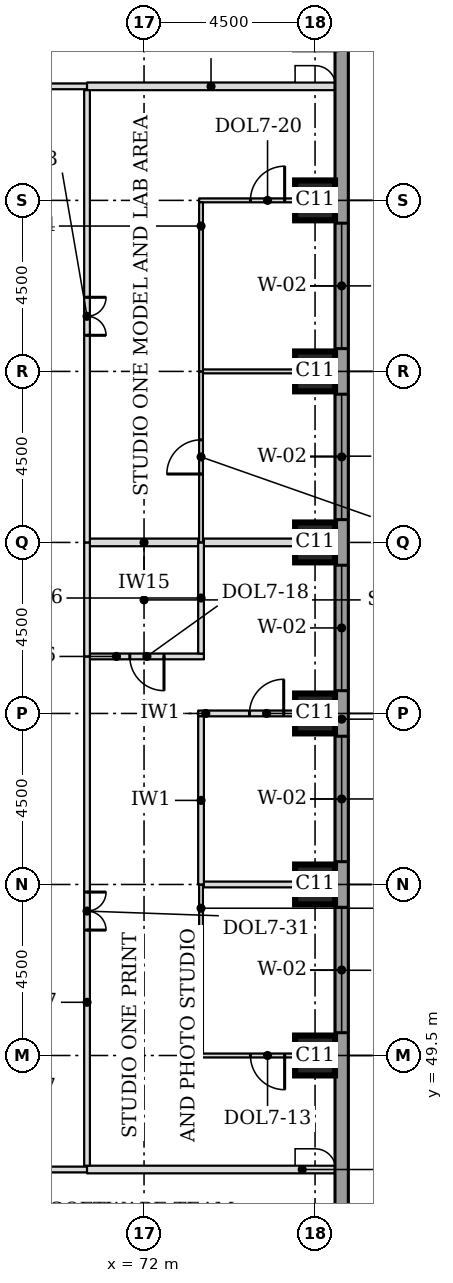
"""IFC4 building model, lengths in metres.
Left out: names, types, materials, properties, quantities, classifications, styles, units other than length and angle.
Written with IfcOpenShell. Run it as: python <this file> out.ifc"""

import sys

from ifc_helpers import new_model, si_unit, direction, frame, frame_2d, origin, origin_2d, place, context, subcontext, project, spatial, rectangle, extrude, element, fill, save


model = new_model("IFC4")
c1 = context("Model", 3, precision=1e-05, world=origin(), true_north=direction((0.0, 1.0)))
c2 = subcontext(c1, "Body", "Model", "MODEL_VIEW")
j1 = project(units=[si_unit("LENGTHUNIT", "METRE"), si_unit("PLANEANGLEUNIT", "RADIAN")], contexts=[c1])
p1 = place(None, origin())
s1 = spatial("IfcSite", under=j1, at=p1, CompositionType="ELEMENT")
p2 = place(p1, origin())
s2 = spatial("IfcBuilding", under=s1, at=p2, CompositionType="ELEMENT")
p3 = place(p2, frame((0.0, 0.0, 127.0)))
s3 = spatial("IfcBuildingStorey", under=s2, at=p3, CompositionType="ELEMENT", Elevation=127.0)
for number, where, z_axis, x_axis in (
    (1, (76.5, 49.5, 0.0), (0.0, 0.0, 1.0), (1.0, 0.0, 0.0)),
    (2, (76.5, 54.0, 0.0), (0.0, 0.0, 1.0), (1.0, 0.0, 0.0)),
    (3, (76.5, 58.5, 0.0), (0.0, 0.0, 1.0), (1.0, 0.0, 0.0)),
    (4, (76.5, 63.0, 0.0), (0.0, 0.0, 1.0), (1.0, 0.0, 0.0)),
    (5, (76.5, 67.5, 0.0), (0.0, 0.0, 1.0), (1.0, 0.0, 0.0)),
    (6, (76.5, 72.0, 0.0), (0.0, 0.0, 1.0), (1.0, 0.0, 0.0)),
):
    element("IfcColumn", number, at=place(p3, frame(where, z_axis=z_axis, x_axis=x_axis)), inside=s3, PredefinedType="COLUMN", context=c2, shape_type="SweptSolid", body=[
        extrude(rectangle(XDim=1.05, YDim=1.05, at=origin_2d()), origin(), (0.0, 0.0, 1.0), 3.7),
    ])
p4 = place(p3, frame((77.2, 44.638, 0.0), z_axis=(0.0, 0.0, 1.0), x_axis=(0.0, 1.0, 0.0)))
e7 = element("IfcWall", 7, at=p4, inside=s3, PredefinedType="STANDARD", context=c2, shape_type="SweptSolid", body=[
    extrude(rectangle(XDim=32.225, YDim=0.35, at=frame_2d((16.112, 0.0))), origin(), (0.0, 0.0, 1.0), 3.525),
])
p5 = place(p4, frame((5.462, 0.0, 0.9)))
e8 = element("IfcOpeningElement", 8, at=p5, cuts=e7, PredefinedType="OPENING", context=c2, shape_type="SweptSolid", body=[
    extrude(rectangle(XDim=3.3, YDim=1.9, at=frame_2d((1.65, 0.95))), frame((0.0, 0.185, 0.0), z_axis=(0.0, -1.0, 0.0), x_axis=(1.0, 0.0, 0.0)), (0.0, 0.0, 1.0), 0.37),
])
p6 = place(p4, frame((9.962, 0.0, 0.9)))
e9 = element("IfcOpeningElement", 9, at=p6, cuts=e7, PredefinedType="OPENING", context=c2, shape_type="SweptSolid", body=[
    extrude(rectangle(XDim=3.3, YDim=1.9, at=frame_2d((1.65, 0.95))), frame((0.0, 0.185, 0.0), z_axis=(0.0, -1.0, 0.0), x_axis=(1.0, 0.0, 0.0)), (0.0, 0.0, 1.0), 0.37),
])
p7 = place(p4, frame((14.462, 0.0, 0.9)))
e10 = element("IfcOpeningElement", 10, at=p7, cuts=e7, PredefinedType="OPENING", context=c2, shape_type="SweptSolid", body=[
    extrude(rectangle(XDim=3.3, YDim=1.9, at=frame_2d((1.65, 0.95))), frame((0.0, 0.185, 0.0), z_axis=(0.0, -1.0, 0.0), x_axis=(1.0, 0.0, 0.0)), (0.0, 0.0, 1.0), 0.37),
])
p8 = place(p4, frame((18.962, 0.0, 0.9)))
e11 = element("IfcOpeningElement", 11, at=p8, cuts=e7, PredefinedType="OPENING", context=c2, shape_type="SweptSolid", body=[
    extrude(rectangle(XDim=3.3, YDim=1.9, at=frame_2d((1.65, 0.95))), frame((0.0, 0.185, 0.0), z_axis=(0.0, -1.0, 0.0), x_axis=(1.0, 0.0, 0.0)), (0.0, 0.0, 1.0), 0.37),
])
p9 = place(p4, frame((23.462, 0.0, 0.9)))
e12 = element("IfcOpeningElement", 12, at=p9, cuts=e7, PredefinedType="OPENING", context=c2, shape_type="SweptSolid", body=[
    extrude(rectangle(XDim=3.3, YDim=1.9, at=frame_2d((1.65, 0.95))), frame((0.0, 0.185, 0.0), z_axis=(0.0, -1.0, 0.0), x_axis=(1.0, 0.0, 0.0)), (0.0, 0.0, 1.0), 0.37),
])
p10 = place(p3, frame((63.0, 46.5, 0.0), z_axis=(0.0, 0.0, 1.0), x_axis=(1.0, 0.0, 0.0)))
e13 = element("IfcWall", 13, at=p10, inside=s3, PredefinedType="PARTITIONING", context=c2, shape_type="SweptSolid", body=[
    extrude(rectangle(XDim=7.5, YDim=0.15, at=frame_2d((3.75, 0.0))), origin(), (0.0, 0.0, 1.0), 3.55),
])
p11 = place(p10, frame((3.25, 0.0, 0.0)))
e14 = element("IfcOpeningElement", 14, at=p11, cuts=e13, PredefinedType="OPENING", context=c2, shape_type="SweptSolid", body=[
    extrude(rectangle(XDim=1.0, YDim=2.1, at=frame_2d((0.5, 1.05))), frame((0.0, 0.085, 0.0), z_axis=(0.0, -1.0, 0.0), x_axis=(1.0, 0.0, 0.0)), (0.0, 0.0, 1.0), 0.17),
])
p12 = place(p3, frame((70.5, 46.5, 0.0), z_axis=(0.0, 0.0, 1.0), x_axis=(1.0, 0.0, 0.0)))
e15 = element("IfcWall", 15, at=p12, inside=s3, PredefinedType="PARTITIONING", context=c2, shape_type="SweptSolid", body=[
    extrude(rectangle(XDim=6.525, YDim=0.2, at=frame_2d((3.262, 0.0))), origin(), (0.0, 0.0, 1.0), 3.55),
])
p13 = place(p3, frame((73.45, 49.5, 0.0), z_axis=(0.0, 0.0, 1.0), x_axis=(1.0, 0.0, 0.0)))
e16 = element("IfcWall", 16, at=p13, inside=s3, PredefinedType="PARTITIONING", context=c2, shape_type="SweptSolid", body=[
    extrude(rectangle(XDim=3.575, YDim=0.1, at=frame_2d((1.788, 0.0))), origin(), (0.0, 0.0, 1.0), 3.55),
])
p14 = place(p13, frame((1.35, 0.0, 0.0)))
e17 = element("IfcOpeningElement", 17, at=p14, cuts=e16, PredefinedType="OPENING", context=c2, shape_type="SweptSolid", body=[
    extrude(rectangle(XDim=0.9, YDim=2.1, at=frame_2d((0.45, 1.05))), frame((0.0, 0.06, 0.0), z_axis=(0.0, -1.0, 0.0), x_axis=(1.0, 0.0, 0.0)), (0.0, 0.0, 1.0), 0.12),
])
p15 = place(p3, frame((73.575, 54.0, 0.0), z_axis=(0.0, 0.0, 1.0), x_axis=(1.0, 0.0, 0.0)))
e18 = element("IfcWall", 18, at=p15, inside=s3, PredefinedType="PARTITIONING", context=c2, shape_type="SweptSolid", body=[
    extrude(rectangle(XDim=3.45, YDim=0.15, at=frame_2d((1.725, 0.0))), origin(), (0.0, 0.0, 1.0), 3.55),
])
p16 = place(p3, frame((73.425, 58.5, 0.0), z_axis=(0.0, 0.0, 1.0), x_axis=(1.0, 0.0, 0.0)))
e19 = element("IfcWall", 19, at=p16, inside=s3, PredefinedType="PARTITIONING", context=c2, shape_type="SweptSolid", body=[
    extrude(rectangle(XDim=3.6, YDim=0.15, at=frame_2d((1.8, 0.0))), origin(), (0.0, 0.0, 1.0), 3.55),
])
p17 = place(p16, frame((1.35, 0.0, 0.0)))
e20 = element("IfcOpeningElement", 20, at=p17, cuts=e19, PredefinedType="OPENING", context=c2, shape_type="SweptSolid", body=[
    extrude(rectangle(XDim=0.9, YDim=2.1, at=frame_2d((0.45, 1.05))), frame((0.0, 0.085, 0.0), z_axis=(0.0, -1.0, 0.0), x_axis=(1.0, 0.0, 0.0)), (0.0, 0.0, 1.0), 0.17),
])
p18 = place(p3, frame((70.575, 60.0, 0.0), z_axis=(0.0, 0.0, 1.0), x_axis=(1.0, 0.0, 0.0)))
e21 = element("IfcWall", 21, at=p18, inside=s3, PredefinedType="PARTITIONING", context=c2, shape_type="SweptSolid", body=[
    extrude(rectangle(XDim=3.0, YDim=0.15, at=frame_2d((1.5, 0.0))), origin(), (0.0, 0.0, 1.0), 3.55),
])
p19 = place(p18, frame((1.05, 0.0, 0.0)))
e22 = element("IfcOpeningElement", 22, at=p19, cuts=e21, PredefinedType="OPENING", context=c2, shape_type="SweptSolid", body=[
    extrude(rectangle(XDim=0.9, YDim=2.1, at=frame_2d((0.45, 1.05))), frame((0.0, 0.085, 0.0), z_axis=(0.0, -1.0, 0.0), x_axis=(1.0, 0.0, 0.0)), (0.0, 0.0, 1.0), 0.17),
])
p20 = place(p3, frame((70.575, 63.0, 0.0), z_axis=(0.0, 0.0, 1.0), x_axis=(1.0, 0.0, 0.0)))
e23 = element("IfcWall", 23, at=p20, inside=s3, PredefinedType="PARTITIONING", context=c2, shape_type="SweptSolid", body=[
    extrude(rectangle(XDim=2.85, YDim=0.2, at=frame_2d((1.425, 0.0))), origin(), (0.0, 0.0, 1.0), 3.55),
])
p21 = place(p3, frame((73.575, 63.0, 0.0), z_axis=(0.0, 0.0, 1.0), x_axis=(1.0, 0.0, 0.0)))
e24 = element("IfcWall", 24, at=p21, inside=s3, PredefinedType="PARTITIONING", context=c2, shape_type="SweptSolid", body=[
    extrude(rectangle(XDim=3.45, YDim=0.2, at=frame_2d((1.725, 0.0))), origin(), (0.0, 0.0, 1.0), 3.55),
])
p22 = place(p3, frame((73.55, 67.5, 0.0), z_axis=(0.0, 0.0, 1.0), x_axis=(1.0, 0.0, 0.0)))
e25 = element("IfcWall", 25, at=p22, inside=s3, PredefinedType="PARTITIONING", context=c2, shape_type="SweptSolid", body=[
    extrude(rectangle(XDim=3.475, YDim=0.1, at=frame_2d((1.737, 0.0))), origin(), (0.0, 0.0, 1.0), 3.55),
])
p23 = place(p3, frame((73.45, 72.0, 0.0), z_axis=(0.0, 0.0, 1.0), x_axis=(1.0, 0.0, 0.0)))
e26 = element("IfcWall", 26, at=p23, inside=s3, PredefinedType="PARTITIONING", context=c2, shape_type="SweptSolid", body=[
    extrude(rectangle(XDim=3.575, YDim=0.1, at=frame_2d((1.788, 0.0))), origin(), (0.0, 0.0, 1.0), 3.55),
])
p24 = place(p23, frame((1.35, 0.0, 0.0)))
e27 = element("IfcOpeningElement", 27, at=p24, cuts=e26, PredefinedType="OPENING", context=c2, shape_type="SweptSolid", body=[
    extrude(rectangle(XDim=0.9, YDim=2.1, at=frame_2d((0.45, 1.05))), frame((0.0, 0.06, 0.0), z_axis=(0.0, -1.0, 0.0), x_axis=(1.0, 0.0, 0.0)), (0.0, 0.0, 1.0), 0.12),
])
p25 = place(p3, frame((58.5, 75.0, 0.0), z_axis=(0.0, 0.0, 1.0), x_axis=(1.0, 0.0, 0.0)))
e28 = element("IfcWall", 28, at=p25, inside=s3, PredefinedType="PARTITIONING", context=c2, shape_type="SweptSolid", body=[
    extrude(rectangle(XDim=12.0, YDim=0.15, at=frame_2d((6.0, 0.0))), origin(), (0.0, 0.0, 1.0), 3.55),
])
p26 = place(p25, frame((5.5, 0.0, 0.0)))
e29 = element("IfcOpeningElement", 29, at=p26, cuts=e28, PredefinedType="OPENING", context=c2, shape_type="SweptSolid", body=[
    extrude(rectangle(XDim=1.0, YDim=2.1, at=frame_2d((0.5, 1.05))), frame((0.0, 0.085, 0.0), z_axis=(0.0, -1.0, 0.0), x_axis=(1.0, 0.0, 0.0)), (0.0, 0.0, 1.0), 0.17),
])
p27 = place(p3, frame((70.5, 75.0, 0.0), z_axis=(0.0, 0.0, 1.0), x_axis=(1.0, 0.0, 0.0)))
e30 = element("IfcWall", 30, at=p27, inside=s3, PredefinedType="PARTITIONING", context=c2, shape_type="SweptSolid", body=[
    extrude(rectangle(XDim=6.525, YDim=0.2, at=frame_2d((3.262, 0.0))), origin(), (0.0, 0.0, 1.0), 3.55),
])
p28 = place(p3, frame((70.5, 46.6, 0.0), z_axis=(0.0, 0.0, 1.0), x_axis=(0.0, 1.0, 0.0)))
e31 = element("IfcWall", 31, at=p28, inside=s3, PredefinedType="PARTITIONING", context=c2, shape_type="SweptSolid", body=[
    extrude(rectangle(XDim=13.4, YDim=0.15, at=frame_2d((6.7, 0.0))), origin(), (0.0, 0.0, 1.0), 3.55),
])
p29 = place(p28, frame((6.2, 0.0, 0.0)))
e32 = element("IfcOpeningElement", 32, at=p29, cuts=e31, PredefinedType="OPENING", context=c2, shape_type="SweptSolid", body=[
    extrude(rectangle(XDim=1.0, YDim=2.1, at=frame_2d((0.5, 1.05))), frame((0.0, 0.085, 0.0), z_axis=(0.0, -1.0, 0.0), x_axis=(1.0, 0.0, 0.0)), (0.0, 0.0, 1.0), 0.17),
])
p30 = place(p3, frame((73.5, 49.55, 0.0), z_axis=(0.0, 0.0, 1.0), x_axis=(0.0, 1.0, 0.0)))
e33 = element("IfcWall", 33, at=p30, inside=s3, PredefinedType="PARTITIONING", context=c2, shape_type="SweptSolid", body=[
    extrude(rectangle(XDim=4.45, YDim=0.1, at=frame_2d((2.225, 0.0))), origin(), (0.0, 0.0, 1.0), 3.55),
])
p31 = place(p3, frame((73.5, 54.0, 0.0), z_axis=(0.0, 0.0, 1.0), x_axis=(0.0, 1.0, 0.0)))
e34 = element("IfcWall", 34, at=p31, inside=s3, PredefinedType="PARTITIONING", context=c2, shape_type="SweptSolid", body=[
    extrude(rectangle(XDim=4.425, YDim=0.15, at=frame_2d((2.212, 0.0))), origin(), (0.0, 0.0, 1.0), 3.55),
])
p32 = place(p3, frame((70.5, 60.0, 0.0), z_axis=(0.0, 0.0, 1.0), x_axis=(0.0, 1.0, 0.0)))
e35 = element("IfcWall", 35, at=p32, inside=s3, PredefinedType="PARTITIONING", context=c2, shape_type="SweptSolid", body=[
    extrude(rectangle(XDim=3.0, YDim=0.15, at=frame_2d((1.5, 0.0))), origin(), (0.0, 0.0, 1.0), 3.55),
])
p33 = place(p3, frame((73.5, 60.075, 0.0), z_axis=(0.0, 0.0, 1.0), x_axis=(0.0, 1.0, 0.0)))
e36 = element("IfcWall", 36, at=p33, inside=s3, PredefinedType="PARTITIONING", context=c2, shape_type="SweptSolid", body=[
    extrude(rectangle(XDim=2.925, YDim=0.15, at=frame_2d((1.462, 0.0))), origin(), (0.0, 0.0, 1.0), 3.55),
])
p34 = place(p3, frame((70.5, 63.0, 0.0), z_axis=(0.0, 0.0, 1.0), x_axis=(0.0, 1.0, 0.0)))
e37 = element("IfcWall", 37, at=p34, inside=s3, PredefinedType="PARTITIONING", context=c2, shape_type="SweptSolid", body=[
    extrude(rectangle(XDim=11.9, YDim=0.15, at=frame_2d((5.95, 0.0))), origin(), (0.0, 0.0, 1.0), 3.55),
])
p35 = place(p34, frame((5.45, 0.0, 0.0)))
e38 = element("IfcOpeningElement", 38, at=p35, cuts=e37, PredefinedType="OPENING", context=c2, shape_type="SweptSolid", body=[
    extrude(rectangle(XDim=1.0, YDim=2.1, at=frame_2d((0.5, 1.05))), frame((0.0, 0.085, 0.0), z_axis=(0.0, -1.0, 0.0), x_axis=(1.0, 0.0, 0.0)), (0.0, 0.0, 1.0), 0.17),
])
p36 = place(p3, frame((73.5, 63.0, 0.0), z_axis=(0.0, 0.0, 1.0), x_axis=(0.0, 1.0, 0.0)))
e39 = element("IfcWall", 39, at=p36, inside=s3, PredefinedType="PARTITIONING", context=c2, shape_type="SweptSolid", body=[
    extrude(rectangle(XDim=4.5, YDim=0.1, at=frame_2d((2.25, 0.0))), origin(), (0.0, 0.0, 1.0), 3.55),
])
p37 = place(p36, frame((1.8, 0.0, 0.0)))
e40 = element("IfcOpeningElement", 40, at=p37, cuts=e39, PredefinedType="OPENING", context=c2, shape_type="SweptSolid", body=[
    extrude(rectangle(XDim=0.9, YDim=2.1, at=frame_2d((0.45, 1.05))), frame((0.0, 0.06, 0.0), z_axis=(0.0, -1.0, 0.0), x_axis=(1.0, 0.0, 0.0)), (0.0, 0.0, 1.0), 0.12),
])
p38 = place(p3, frame((73.5, 67.5, 0.0), z_axis=(0.0, 0.0, 1.0), x_axis=(0.0, 1.0, 0.0)))
e41 = element("IfcWall", 41, at=p38, inside=s3, PredefinedType="PARTITIONING", context=c2, shape_type="SweptSolid", body=[
    extrude(rectangle(XDim=4.45, YDim=0.1, at=frame_2d((2.225, 0.0))), origin(), (0.0, 0.0, 1.0), 3.55),
])
p39 = place(p5, origin())
e42 = element("IfcWindow", 42, at=p39, inside=s3, PartitioningType="SINGLE_PANEL", PredefinedType="WINDOW", context=c2, shape_type="SweptSolid", body=[
    extrude(rectangle(XDim=3.3, YDim=1.9, at=frame_2d((1.65, 0.95))), frame((0.0, 0.085, 0.0), z_axis=(0.0, -1.0, 0.0), x_axis=(1.0, 0.0, 0.0)), (0.0, 0.0, 1.0), 0.06),
])
fill(e8, e42)
p40 = place(p6, origin())
e43 = element("IfcWindow", 43, at=p40, inside=s3, PartitioningType="SINGLE_PANEL", PredefinedType="WINDOW", context=c2, shape_type="SweptSolid", body=[
    extrude(rectangle(XDim=3.3, YDim=1.9, at=frame_2d((1.65, 0.95))), frame((0.0, 0.085, 0.0), z_axis=(0.0, -1.0, 0.0), x_axis=(1.0, 0.0, 0.0)), (0.0, 0.0, 1.0), 0.06),
])
fill(e9, e43)
p41 = place(p7, origin())
e44 = element("IfcWindow", 44, at=p41, inside=s3, PartitioningType="SINGLE_PANEL", PredefinedType="WINDOW", context=c2, shape_type="SweptSolid", body=[
    extrude(rectangle(XDim=3.3, YDim=1.9, at=frame_2d((1.65, 0.95))), frame((0.0, 0.085, 0.0), z_axis=(0.0, -1.0, 0.0), x_axis=(1.0, 0.0, 0.0)), (0.0, 0.0, 1.0), 0.06),
])
fill(e10, e44)
p42 = place(p8, origin())
e45 = element("IfcWindow", 45, at=p42, inside=s3, PartitioningType="SINGLE_PANEL", PredefinedType="WINDOW", context=c2, shape_type="SweptSolid", body=[
    extrude(rectangle(XDim=3.3, YDim=1.9, at=frame_2d((1.65, 0.95))), frame((0.0, 0.085, 0.0), z_axis=(0.0, -1.0, 0.0), x_axis=(1.0, 0.0, 0.0)), (0.0, 0.0, 1.0), 0.06),
])
fill(e11, e45)
p43 = place(p9, origin())
e46 = element("IfcWindow", 46, at=p43, inside=s3, PartitioningType="SINGLE_PANEL", PredefinedType="WINDOW", context=c2, shape_type="SweptSolid", body=[
    extrude(rectangle(XDim=3.3, YDim=1.9, at=frame_2d((1.65, 0.95))), frame((0.0, 0.085, 0.0), z_axis=(0.0, -1.0, 0.0), x_axis=(1.0, 0.0, 0.0)), (0.0, 0.0, 1.0), 0.06),
])
fill(e12, e46)
p44 = place(p29, frame((1.0, 0.0, 0.0), z_axis=(0.0, 0.0, 1.0), x_axis=(-1.0, 0.0, 0.0)))
e47 = element("IfcDoor", 47, at=p44, inside=s3, OperationType="DOUBLE_DOOR_SINGLE_SWING", PredefinedType="DOOR", context=c2, shape_type="SweptSolid", body=[
    extrude(rectangle(XDim=1.0, YDim=2.1, at=frame_2d((0.5, 1.05))), frame((0.0, 0.025, 0.0), z_axis=(0.0, -1.0, 0.0), x_axis=(1.0, 0.0, 0.0)), (0.0, 0.0, 1.0), 0.05),
])
fill(e32, e47)
p45 = place(p14, frame((0.9, 0.0, 0.0), z_axis=(0.0, 0.0, 1.0), x_axis=(-1.0, 0.0, 0.0)))
e48 = element("IfcDoor", 48, at=p45, inside=s3, OperationType="SINGLE_SWING_LEFT", PredefinedType="DOOR", context=c2, shape_type="SweptSolid", body=[
    extrude(rectangle(XDim=0.9, YDim=2.1, at=frame_2d((0.45, 1.05))), frame((0.0, 0.025, 0.0), z_axis=(0.0, -1.0, 0.0), x_axis=(1.0, 0.0, 0.0)), (0.0, 0.0, 1.0), 0.05),
])
fill(e17, e48)
p46 = place(p19, frame((0.9, 0.0, 0.0), z_axis=(0.0, 0.0, 1.0), x_axis=(-1.0, 0.0, 0.0)))
e49 = element("IfcDoor", 49, at=p46, inside=s3, OperationType="SINGLE_SWING_LEFT", PredefinedType="DOOR", context=c2, shape_type="SweptSolid", body=[
    extrude(rectangle(XDim=0.9, YDim=2.1, at=frame_2d((0.45, 1.05))), frame((0.0, 0.025, 0.0), z_axis=(0.0, -1.0, 0.0), x_axis=(1.0, 0.0, 0.0)), (0.0, 0.0, 1.0), 0.05),
])
fill(e22, e49)
p47 = place(p17, origin())
e50 = element("IfcDoor", 50, at=p47, inside=s3, OperationType="SINGLE_SWING_RIGHT", PredefinedType="DOOR", context=c2, shape_type="SweptSolid", body=[
    extrude(rectangle(XDim=0.9, YDim=2.1, at=frame_2d((0.45, 1.05))), frame((0.0, 0.025, 0.0), z_axis=(0.0, -1.0, 0.0), x_axis=(1.0, 0.0, 0.0)), (0.0, 0.0, 1.0), 0.05),
])
fill(e20, e50)
p48 = place(p35, frame((1.0, 0.0, 0.0), z_axis=(0.0, 0.0, 1.0), x_axis=(-1.0, 0.0, 0.0)))
e51 = element("IfcDoor", 51, at=p48, inside=s3, OperationType="DOUBLE_DOOR_SINGLE_SWING", PredefinedType="DOOR", context=c2, shape_type="SweptSolid", body=[
    extrude(rectangle(XDim=1.0, YDim=2.1, at=frame_2d((0.5, 1.05))), frame((0.0, 0.025, 0.0), z_axis=(0.0, -1.0, 0.0), x_axis=(1.0, 0.0, 0.0)), (0.0, 0.0, 1.0), 0.05),
])
fill(e38, e51)
p49 = place(p37, origin())
e52 = element("IfcDoor", 52, at=p49, inside=s3, OperationType="SINGLE_SWING_LEFT", PredefinedType="DOOR", context=c2, shape_type="SweptSolid", body=[
    extrude(rectangle(XDim=0.9, YDim=2.1, at=frame_2d((0.45, 1.05))), frame((0.0, 0.025, 0.0), z_axis=(0.0, -1.0, 0.0), x_axis=(1.0, 0.0, 0.0)), (0.0, 0.0, 1.0), 0.05),
])
fill(e40, e52)
p50 = place(p24, origin())
e53 = element("IfcDoor", 53, at=p50, inside=s3, OperationType="SINGLE_SWING_RIGHT", PredefinedType="DOOR", context=c2, shape_type="SweptSolid", body=[
    extrude(rectangle(XDim=0.9, YDim=2.1, at=frame_2d((0.45, 1.05))), frame((0.0, 0.025, 0.0), z_axis=(0.0, -1.0, 0.0), x_axis=(1.0, 0.0, 0.0)), (0.0, 0.0, 1.0), 0.05),
])
fill(e27, e53)
save(model, sys.argv[1])
